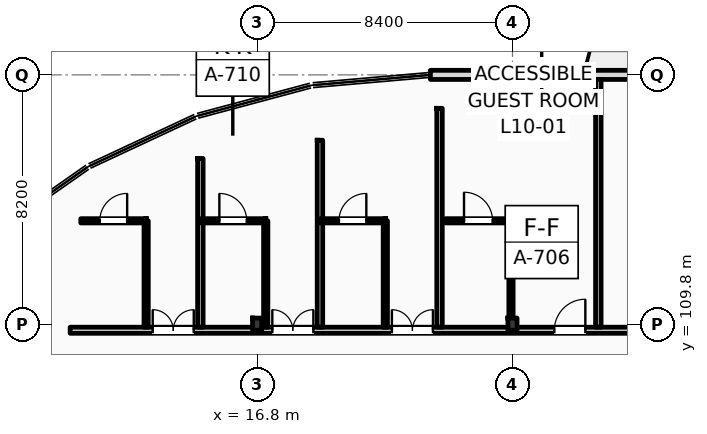
"""IFC4 building model, lengths in metres.
Left out: names, types, materials, properties, quantities, classifications, styles, units other than length and angle.
Written with IfcOpenShell. Run it as: python <this file> out.ifc"""

import sys

from ifc_helpers import new_model, si_unit, direction, frame, frame_2d, origin, origin_2d, place, context, subcontext, project, spatial, rectangle, i_section, extrude, element, fill, save


model = new_model("IFC4")
c1 = context("Model", 3, precision=1e-05, world=origin(), true_north=direction((0.0, 1.0)))
c2 = subcontext(c1, "Body", "Model", "MODEL_VIEW")
j1 = project(units=[si_unit("LENGTHUNIT", "METRE"), si_unit("PLANEANGLEUNIT", "RADIAN")], contexts=[c1])
p1 = place(None, origin())
s1 = spatial("IfcSite", under=j1, at=p1, CompositionType="ELEMENT")
p2 = place(p1, origin())
s2 = spatial("IfcBuilding", under=s1, at=p2, CompositionType="ELEMENT")
p3 = place(p2, frame((0.0, 0.0, 42.6)))
s3 = spatial("IfcBuildingStorey", under=s2, at=p3, CompositionType="ELEMENT", Elevation=42.6)
for number, where, z_axis, x_axis in (
    (1, (16.8, 109.8, 0.0), (0.0, 0.0, 1.0), (1.0, 0.0, 0.0)),
    (2, (25.2, 109.8, 0.0), (0.0, 0.0, 1.0), (1.0, 0.0, 0.0)),
):
    element("IfcColumn", number, at=place(p3, frame(where, z_axis=z_axis, x_axis=x_axis)), inside=s3, PredefinedType="COLUMN", context=c2, shape_type="SweptSolid", body=[
        extrude(i_section(OverallWidth=0.3, OverallDepth=0.4, WebThickness=0.013, FlangeThickness=0.024, FilletRadius=0.027, at=origin_2d()), origin(), (0.0, 0.0, 1.0), 4.2),
    ])
p4 = place(p3, frame((25.2, 118.0, 0.0), z_axis=(0.0, 0.0, 1.0), x_axis=(1.0, 0.0, 0.0)))
e3 = element("IfcColumn", 3, at=p4, inside=s3, PredefinedType="COLUMN", context=c2, shape_type="SweptSolid", body=[
    extrude(i_section(OverallWidth=0.3, OverallDepth=0.34, WebThickness=0.012, FlangeThickness=0.021, FilletRadius=0.027, at=origin_2d()), origin(), (0.0, 0.0, 1.0), 4.2),
])
p5 = place(p3, frame((22.5, 118.0, 0.0), z_axis=(0.0, 0.0, 1.0), x_axis=(1.0, 0.0, 0.0)))
e4 = element("IfcWall", 4, at=p5, inside=s3, PredefinedType="STANDARD", context=c2, shape_type="SweptSolid", body=[
    extrude(rectangle(XDim=72.9, YDim=0.3, at=frame_2d((36.45, 0.0))), origin(), (0.0, 0.0, 1.0), 3.42),
])
p6 = place(p5, frame((3.611, 0.0, 0.9)))
e5 = element("IfcOpeningElement", 5, at=p6, cuts=e4, PredefinedType="OPENING", context=c2, shape_type="SweptSolid", body=[
    extrude(rectangle(XDim=1.35, YDim=1.75, at=frame_2d((0.675, 0.875))), frame((0.0, 0.16, 0.0), z_axis=(0.0, -1.0, 0.0), x_axis=(1.0, 0.0, 0.0)), (0.0, 0.0, 1.0), 0.32),
])
p7 = place(p5, frame((7.091, 0.0, 0.0)))
e6 = element("IfcOpeningElement", 6, at=p7, cuts=e4, PredefinedType="OPENING", context=c2, shape_type="SweptSolid", body=[
    extrude(rectangle(XDim=1.2, YDim=2.25, at=frame_2d((0.6, 1.125))), frame((0.0, 0.16, 0.0), z_axis=(0.0, -1.0, 0.0), x_axis=(1.0, 0.0, 0.0)), (0.0, 0.0, 1.0), 0.32),
])
p8 = place(p5, frame((12.328, 0.0, 0.9)))
e7 = element("IfcOpeningElement", 7, at=p8, cuts=e4, PredefinedType="OPENING", context=c2, shape_type="SweptSolid", body=[
    extrude(rectangle(XDim=2.0, YDim=2.34, at=frame_2d((1.0, 1.17))), frame((0.0, 0.16, 0.0), z_axis=(0.0, -1.0, 0.0), x_axis=(1.0, 0.0, 0.0)), (0.0, 0.0, 1.0), 0.32),
])
p9 = place(p5, frame((19.12, 0.0, 0.9)))
e8 = element("IfcOpeningElement", 8, at=p9, cuts=e4, PredefinedType="OPENING", context=c2, shape_type="SweptSolid", body=[
    extrude(rectangle(XDim=1.35, YDim=2.34, at=frame_2d((0.675, 1.17))), frame((0.0, 0.16, 0.0), z_axis=(0.0, -1.0, 0.0), x_axis=(1.0, 0.0, 0.0)), (0.0, 0.0, 1.0), 0.32),
])
p10 = place(p5, frame((22.696, 0.0, 0.0)))
e9 = element("IfcOpeningElement", 9, at=p10, cuts=e4, PredefinedType="OPENING", context=c2, shape_type="SweptSolid", body=[
    extrude(rectangle(XDim=1.2, YDim=2.25, at=frame_2d((0.6, 1.125))), frame((0.0, 0.16, 0.0), z_axis=(0.0, -1.0, 0.0), x_axis=(1.0, 0.0, 0.0)), (0.0, 0.0, 1.0), 0.32),
])
p11 = place(p5, frame((27.205, 0.0, 0.9)))
e10 = element("IfcOpeningElement", 10, at=p11, cuts=e4, PredefinedType="OPENING", context=c2, shape_type="SweptSolid", body=[
    extrude(rectangle(XDim=3.1, YDim=2.34, at=frame_2d((1.55, 1.17))), frame((0.0, 0.16, 0.0), z_axis=(0.0, -1.0, 0.0), x_axis=(1.0, 0.0, 0.0)), (0.0, 0.0, 1.0), 0.32),
])
p12 = place(p5, frame((31.948, 0.0, 0.9)))
e11 = element("IfcOpeningElement", 11, at=p12, cuts=e4, PredefinedType="OPENING", context=c2, shape_type="SweptSolid", body=[
    extrude(rectangle(XDim=1.1, YDim=2.34, at=frame_2d((0.55, 1.17))), frame((0.0, 0.16, 0.0), z_axis=(0.0, -1.0, 0.0), x_axis=(1.0, 0.0, 0.0)), (0.0, 0.0, 1.0), 0.32),
])
p13 = place(p5, frame((38.12, 0.0, 0.0)))
e12 = element("IfcOpeningElement", 12, at=p13, cuts=e4, PredefinedType="OPENING", context=c2, shape_type="SweptSolid", body=[
    extrude(rectangle(XDim=1.2, YDim=2.25, at=frame_2d((0.6, 1.125))), frame((0.0, 0.16, 0.0), z_axis=(0.0, -1.0, 0.0), x_axis=(1.0, 0.0, 0.0)), (0.0, 0.0, 1.0), 0.32),
])
p14 = place(p5, frame((43.51, 0.0, 0.9)))
e13 = element("IfcOpeningElement", 13, at=p14, cuts=e4, PredefinedType="OPENING", context=c2, shape_type="SweptSolid", body=[
    extrude(rectangle(XDim=1.35, YDim=1.85, at=frame_2d((0.675, 0.925))), frame((0.0, 0.16, 0.0), z_axis=(0.0, -1.0, 0.0), x_axis=(1.0, 0.0, 0.0)), (0.0, 0.0, 1.0), 0.32),
])
p15 = place(p5, frame((47.178, 0.0, 0.9)))
e14 = element("IfcOpeningElement", 14, at=p15, cuts=e4, PredefinedType="OPENING", context=c2, shape_type="SweptSolid", body=[
    extrude(rectangle(XDim=1.5, YDim=1.9, at=frame_2d((0.75, 0.95))), frame((0.0, 0.16, 0.0), z_axis=(0.0, -1.0, 0.0), x_axis=(1.0, 0.0, 0.0)), (0.0, 0.0, 1.0), 0.32),
])
p16 = place(p5, frame((53.724, 0.0, 0.0)))
e15 = element("IfcOpeningElement", 15, at=p16, cuts=e4, PredefinedType="OPENING", context=c2, shape_type="SweptSolid", body=[
    extrude(rectangle(XDim=1.2, YDim=2.25, at=frame_2d((0.6, 1.125))), frame((0.0, 0.16, 0.0), z_axis=(0.0, -1.0, 0.0), x_axis=(1.0, 0.0, 0.0)), (0.0, 0.0, 1.0), 0.32),
])
p17 = place(p5, frame((58.712, 0.0, 0.9)))
e16 = element("IfcOpeningElement", 16, at=p17, cuts=e4, PredefinedType="OPENING", context=c2, shape_type="SweptSolid", body=[
    extrude(rectangle(XDim=1.8, YDim=2.0, at=frame_2d((0.9, 1.0))), frame((0.0, 0.16, 0.0), z_axis=(0.0, -1.0, 0.0), x_axis=(1.0, 0.0, 0.0)), (0.0, 0.0, 1.0), 0.32),
])
p18 = place(p5, frame((62.781, 0.0, 0.9)))
e17 = element("IfcOpeningElement", 17, at=p18, cuts=e4, PredefinedType="OPENING", context=c2, shape_type="SweptSolid", body=[
    extrude(rectangle(XDim=1.35, YDim=2.05, at=frame_2d((0.675, 1.025))), frame((0.0, 0.16, 0.0), z_axis=(0.0, -1.0, 0.0), x_axis=(1.0, 0.0, 0.0)), (0.0, 0.0, 1.0), 0.32),
])
p19 = place(p5, frame((68.819, 0.0, 0.9)))
e18 = element("IfcOpeningElement", 18, at=p19, cuts=e4, PredefinedType="OPENING", context=c2, shape_type="SweptSolid", body=[
    extrude(rectangle(XDim=2.1, YDim=2.1, at=frame_2d((1.05, 1.05))), frame((0.0, 0.16, 0.0), z_axis=(0.0, -1.0, 0.0), x_axis=(1.0, 0.0, 0.0)), (0.0, 0.0, 1.0), 0.32),
])
p20 = place(p3, frame((10.65, 109.6, 0.0), z_axis=(0.0, 0.0, 1.0), x_axis=(1.0, 0.0, 0.0)))
e19 = element("IfcWall", 19, at=p20, inside=s3, PredefinedType="PARTITIONING", context=c2, shape_type="SweptSolid", body=[
    extrude(rectangle(XDim=84.61, YDim=0.2, at=frame_2d((42.305, 0.0))), origin(), (0.0, 0.0, 1.0), 3.38),
])
p21 = place(p20, frame((15.926, 0.0, 0.0)))
e20 = element("IfcOpeningElement", 20, at=p21, cuts=e19, PredefinedType="OPENING", context=c2, shape_type="SweptSolid", body=[
    extrude(rectangle(XDim=1.02, YDim=2.2, at=frame_2d((0.51, 1.1))), frame((0.0, 0.11, 0.0), z_axis=(0.0, -1.0, 0.0), x_axis=(1.0, 0.0, 0.0)), (0.0, 0.0, 1.0), 0.22),
])
p22 = place(p20, frame((18.45, 0.0, 0.0)))
e21 = element("IfcOpeningElement", 21, at=p22, cuts=e19, PredefinedType="OPENING", context=c2, shape_type="SweptSolid", body=[
    extrude(rectangle(XDim=1.02, YDim=2.2, at=frame_2d((0.51, 1.1))), frame((0.0, 0.11, 0.0), z_axis=(0.0, -1.0, 0.0), x_axis=(1.0, 0.0, 0.0)), (0.0, 0.0, 1.0), 0.22),
])
p23 = place(p20, frame((25.742, 0.0, 0.0)))
e22 = element("IfcOpeningElement", 22, at=p23, cuts=e19, PredefinedType="OPENING", context=c2, shape_type="SweptSolid", body=[
    extrude(rectangle(XDim=1.02, YDim=2.2, at=frame_2d((0.51, 1.1))), frame((0.0, 0.11, 0.0), z_axis=(0.0, -1.0, 0.0), x_axis=(1.0, 0.0, 0.0)), (0.0, 0.0, 1.0), 0.22),
])
p24 = place(p20, frame((31.385, 0.0, 0.0)))
e23 = element("IfcOpeningElement", 23, at=p24, cuts=e19, PredefinedType="OPENING", context=c2, shape_type="SweptSolid", body=[
    extrude(rectangle(XDim=1.02, YDim=2.2, at=frame_2d((0.51, 1.1))), frame((0.0, 0.11, 0.0), z_axis=(0.0, -1.0, 0.0), x_axis=(1.0, 0.0, 0.0)), (0.0, 0.0, 1.0), 0.22),
])
p25 = place(p20, frame((33.908, 0.0, 0.0)))
e24 = element("IfcOpeningElement", 24, at=p25, cuts=e19, PredefinedType="OPENING", context=c2, shape_type="SweptSolid", body=[
    extrude(rectangle(XDim=0.96, YDim=2.2, at=frame_2d((0.48, 1.1))), frame((0.0, 0.11, 0.0), z_axis=(0.0, -1.0, 0.0), x_axis=(1.0, 0.0, 0.0)), (0.0, 0.0, 1.0), 0.22),
])
p26 = place(p20, frame((41.201, 0.0, 0.0)))
e25 = element("IfcOpeningElement", 25, at=p26, cuts=e19, PredefinedType="OPENING", context=c2, shape_type="SweptSolid", body=[
    extrude(rectangle(XDim=0.96, YDim=2.2, at=frame_2d((0.48, 1.1))), frame((0.0, 0.11, 0.0), z_axis=(0.0, -1.0, 0.0), x_axis=(1.0, 0.0, 0.0)), (0.0, 0.0, 1.0), 0.22),
])
p27 = place(p20, frame((46.844, 0.0, 0.0)))
e26 = element("IfcOpeningElement", 26, at=p27, cuts=e19, PredefinedType="OPENING", context=c2, shape_type="SweptSolid", body=[
    extrude(rectangle(XDim=0.96, YDim=2.2, at=frame_2d((0.48, 1.1))), frame((0.0, 0.11, 0.0), z_axis=(0.0, -1.0, 0.0), x_axis=(1.0, 0.0, 0.0)), (0.0, 0.0, 1.0), 0.22),
])
p28 = place(p20, frame((49.337, 0.0, 0.0)))
e27 = element("IfcOpeningElement", 27, at=p28, cuts=e19, PredefinedType="OPENING", context=c2, shape_type="SweptSolid", body=[
    extrude(rectangle(XDim=0.96, YDim=2.2, at=frame_2d((0.48, 1.1))), frame((0.0, 0.11, 0.0), z_axis=(0.0, -1.0, 0.0), x_axis=(1.0, 0.0, 0.0)), (0.0, 0.0, 1.0), 0.22),
])
p29 = place(p20, frame((56.63, 0.0, 0.0)))
e28 = element("IfcOpeningElement", 28, at=p29, cuts=e19, PredefinedType="OPENING", context=c2, shape_type="SweptSolid", body=[
    extrude(rectangle(XDim=0.96, YDim=2.2, at=frame_2d((0.48, 1.1))), frame((0.0, 0.11, 0.0), z_axis=(0.0, -1.0, 0.0), x_axis=(1.0, 0.0, 0.0)), (0.0, 0.0, 1.0), 0.22),
])
p30 = place(p20, frame((62.523, 0.0, 0.0)))
e29 = element("IfcOpeningElement", 29, at=p30, cuts=e19, PredefinedType="OPENING", context=c2, shape_type="SweptSolid", body=[
    extrude(rectangle(XDim=0.96, YDim=2.2, at=frame_2d((0.48, 1.1))), frame((0.0, 0.11, 0.0), z_axis=(0.0, -1.0, 0.0), x_axis=(1.0, 0.0, 0.0)), (0.0, 0.0, 1.0), 0.22),
])
p31 = place(p20, frame((64.765, 0.0, 0.0)))
e30 = element("IfcOpeningElement", 30, at=p31, cuts=e19, PredefinedType="OPENING", context=c2, shape_type="SweptSolid", body=[
    extrude(rectangle(XDim=0.96, YDim=2.2, at=frame_2d((0.48, 1.1))), frame((0.0, 0.11, 0.0), z_axis=(0.0, -1.0, 0.0), x_axis=(1.0, 0.0, 0.0)), (0.0, 0.0, 1.0), 0.22),
])
p32 = place(p20, frame((72.057, 0.0, 0.0)))
e31 = element("IfcOpeningElement", 31, at=p32, cuts=e19, PredefinedType="OPENING", context=c2, shape_type="SweptSolid", body=[
    extrude(rectangle(XDim=0.96, YDim=2.2, at=frame_2d((0.48, 1.1))), frame((0.0, 0.11, 0.0), z_axis=(0.0, -1.0, 0.0), x_axis=(1.0, 0.0, 0.0)), (0.0, 0.0, 1.0), 0.22),
])
p33 = place(p20, frame((74.55, 0.0, 0.0)))
e32 = element("IfcOpeningElement", 32, at=p33, cuts=e19, PredefinedType="OPENING", context=c2, shape_type="SweptSolid", body=[
    extrude(rectangle(XDim=0.96, YDim=2.2, at=frame_2d((0.48, 1.1))), frame((0.0, 0.11, 0.0), z_axis=(0.0, -1.0, 0.0), x_axis=(1.0, 0.0, 0.0)), (0.0, 0.0, 1.0), 0.22),
])
p34 = place(p20, frame((80.163, 0.0, 0.0)))
e33 = element("IfcOpeningElement", 33, at=p34, cuts=e19, PredefinedType="OPENING", context=c2, shape_type="SweptSolid", body=[
    extrude(rectangle(XDim=0.96, YDim=2.2, at=frame_2d((0.48, 1.1))), frame((0.0, 0.11, 0.0), z_axis=(0.0, -1.0, 0.0), x_axis=(1.0, 0.0, 0.0)), (0.0, 0.0, 1.0), 0.22),
])
p35 = place(p20, frame((2.716, 0.0, 0.0)))
e34 = element("IfcOpeningElement", 34, at=p35, cuts=e19, PredefinedType="OPENING", context=c2, shape_type="SweptSolid", body=[
    extrude(rectangle(XDim=1.35, YDim=2.25, at=frame_2d((0.675, 1.125))), frame((0.0, 0.11, 0.0), z_axis=(0.0, -1.0, 0.0), x_axis=(1.0, 0.0, 0.0)), (0.0, 0.0, 1.0), 0.22),
])
p36 = place(p20, frame((6.65, 0.0, 0.0)))
e35 = element("IfcOpeningElement", 35, at=p36, cuts=e19, PredefinedType="OPENING", context=c2, shape_type="SweptSolid", body=[
    extrude(rectangle(XDim=1.35, YDim=2.25, at=frame_2d((0.675, 1.125))), frame((0.0, 0.11, 0.0), z_axis=(0.0, -1.0, 0.0), x_axis=(1.0, 0.0, 0.0)), (0.0, 0.0, 1.0), 0.22),
])
p37 = place(p20, frame((10.583, 0.0, 0.0)))
e36 = element("IfcOpeningElement", 36, at=p37, cuts=e19, PredefinedType="OPENING", context=c2, shape_type="SweptSolid", body=[
    extrude(rectangle(XDim=1.35, YDim=2.25, at=frame_2d((0.675, 1.125))), frame((0.0, 0.11, 0.0), z_axis=(0.0, -1.0, 0.0), x_axis=(1.0, 0.0, 0.0)), (0.0, 0.0, 1.0), 0.22),
])
p38 = place(p3, frame((28.023, 109.7, 0.0), z_axis=(0.0, 0.0, 1.0), x_axis=(0.0, 1.0, 0.0)))
e37 = element("IfcWall", 37, at=p38, inside=s3, PredefinedType="PARTITIONING", context=c2, shape_type="SweptSolid", body=[
    extrude(rectangle(XDim=8.15, YDim=0.18, at=frame_2d((4.075, 0.0))), origin(), (0.0, 0.0, 1.0), 3.63),
])
p39 = place(p3, frame((25.15, 109.7, 0.0), z_axis=(0.0, 0.0, 1.0), x_axis=(0.0, 1.0, 0.0)))
e38 = element("IfcWall", 38, at=p39, inside=s3, PredefinedType="PARTITIONING", context=c2, shape_type="SweptSolid", body=[
    extrude(rectangle(XDim=3.5, YDim=0.14, at=frame_2d((1.75, 0.0))), origin(), (0.0, 0.0, 1.0), 3.57),
])
p40 = place(p3, frame((23.0, 113.2, 0.0), z_axis=(0.0, 0.0, 1.0), x_axis=(1.0, 0.0, 0.0)))
e39 = element("IfcWall", 39, at=p40, inside=s3, PredefinedType="PARTITIONING", context=c2, shape_type="SweptSolid", body=[
    extrude(rectangle(XDim=2.15, YDim=0.14, at=frame_2d((1.075, 0.0))), origin(), (0.0, 0.0, 1.0), 3.94),
])
p41 = place(p40, frame((0.605, 0.0, 0.0)))
e40 = element("IfcOpeningElement", 40, at=p41, cuts=e39, PredefinedType="OPENING", context=c2, shape_type="SweptSolid", body=[
    extrude(rectangle(XDim=0.94, YDim=2.15, at=frame_2d((0.47, 1.075))), frame((0.0, 0.08, 0.0), z_axis=(0.0, -1.0, 0.0), x_axis=(1.0, 0.0, 0.0)), (0.0, 0.0, 1.0), 0.16),
])
p42 = place(p3, frame((14.933, 109.7, 0.0), z_axis=(0.0, 0.0, 1.0), x_axis=(0.0, 1.0, 0.0)))
e41 = element("IfcWall", 41, at=p42, inside=s3, PredefinedType="PARTITIONING", context=c2, shape_type="SweptSolid", body=[
    extrude(rectangle(XDim=5.55, YDim=0.18, at=frame_2d((2.775, 0.0))), origin(), (0.0, 0.0, 1.0), 3.94),
])
p43 = place(p3, frame((13.15, 109.7, 0.0), z_axis=(0.0, 0.0, 1.0), x_axis=(0.0, 1.0, 0.0)))
e42 = element("IfcWall", 42, at=p43, inside=s3, PredefinedType="PARTITIONING", context=c2, shape_type="SweptSolid", body=[
    extrude(rectangle(XDim=3.5, YDim=0.14, at=frame_2d((1.75, 0.0))), origin(), (0.0, 0.0, 1.0), 3.94),
])
p44 = place(p3, frame((11.0, 113.2, 0.0), z_axis=(0.0, 0.0, 1.0), x_axis=(1.0, 0.0, 0.0)))
e43 = element("IfcWall", 43, at=p44, inside=s3, PredefinedType="PARTITIONING", context=c2, shape_type="SweptSolid", body=[
    extrude(rectangle(XDim=2.15, YDim=0.14, at=frame_2d((1.075, 0.0))), origin(), (0.0, 0.0, 1.0), 3.94),
])
p45 = place(p44, frame((0.625, 0.0, 0.0)))
e44 = element("IfcOpeningElement", 44, at=p45, cuts=e43, PredefinedType="OPENING", context=c2, shape_type="SweptSolid", body=[
    extrude(rectangle(XDim=0.9, YDim=2.1, at=frame_2d((0.45, 1.05))), frame((0.0, 0.08, 0.0), z_axis=(0.0, -1.0, 0.0), x_axis=(1.0, 0.0, 0.0)), (0.0, 0.0, 1.0), 0.16),
])
p46 = place(p3, frame((18.867, 109.7, 0.0), z_axis=(0.0, 0.0, 1.0), x_axis=(0.0, 1.0, 0.0)))
e45 = element("IfcWall", 45, at=p46, inside=s3, PredefinedType="PARTITIONING", context=c2, shape_type="SweptSolid", body=[
    extrude(rectangle(XDim=6.15, YDim=0.18, at=frame_2d((3.075, 0.0))), origin(), (0.0, 0.0, 1.0), 3.94),
])
p47 = place(p3, frame((17.083, 109.7, 0.0), z_axis=(0.0, 0.0, 1.0), x_axis=(0.0, 1.0, 0.0)))
e46 = element("IfcWall", 46, at=p47, inside=s3, PredefinedType="PARTITIONING", context=c2, shape_type="SweptSolid", body=[
    extrude(rectangle(XDim=3.5, YDim=0.14, at=frame_2d((1.75, 0.0))), origin(), (0.0, 0.0, 1.0), 3.94),
])
p48 = place(p3, frame((14.933, 113.2, 0.0), z_axis=(0.0, 0.0, 1.0), x_axis=(1.0, 0.0, 0.0)))
e47 = element("IfcWall", 47, at=p48, inside=s3, PredefinedType="PARTITIONING", context=c2, shape_type="SweptSolid", body=[
    extrude(rectangle(XDim=2.15, YDim=0.14, at=frame_2d((1.075, 0.0))), origin(), (0.0, 0.0, 1.0), 3.94),
])
p49 = place(p48, frame((0.625, 0.0, 0.0)))
e48 = element("IfcOpeningElement", 48, at=p49, cuts=e47, PredefinedType="OPENING", context=c2, shape_type="SweptSolid", body=[
    extrude(rectangle(XDim=0.9, YDim=2.1, at=frame_2d((0.45, 1.05))), frame((0.0, 0.08, 0.0), z_axis=(0.0, -1.0, 0.0), x_axis=(1.0, 0.0, 0.0)), (0.0, 0.0, 1.0), 0.16),
])
p50 = place(p3, frame((22.8, 109.7, 0.0), z_axis=(0.0, 0.0, 1.0), x_axis=(0.0, 1.0, 0.0)))
e49 = element("IfcWall", 49, at=p50, inside=s3, PredefinedType="PARTITIONING", context=c2, shape_type="SweptSolid", body=[
    extrude(rectangle(XDim=7.2, YDim=0.18, at=frame_2d((3.6, 0.0))), origin(), (0.0, 0.0, 1.0), 3.94),
])
p51 = place(p3, frame((21.017, 109.7, 0.0), z_axis=(0.0, 0.0, 1.0), x_axis=(0.0, 1.0, 0.0)))
e50 = element("IfcWall", 50, at=p51, inside=s3, PredefinedType="PARTITIONING", context=c2, shape_type="SweptSolid", body=[
    extrude(rectangle(XDim=3.5, YDim=0.14, at=frame_2d((1.75, 0.0))), origin(), (0.0, 0.0, 1.0), 3.94),
])
p52 = place(p3, frame((18.867, 113.2, 0.0), z_axis=(0.0, 0.0, 1.0), x_axis=(1.0, 0.0, 0.0)))
e51 = element("IfcWall", 51, at=p52, inside=s3, PredefinedType="PARTITIONING", context=c2, shape_type="SweptSolid", body=[
    extrude(rectangle(XDim=2.15, YDim=0.14, at=frame_2d((1.075, 0.0))), origin(), (0.0, 0.0, 1.0), 3.94),
])
p53 = place(p52, frame((0.625, 0.0, 0.0)))
e52 = element("IfcOpeningElement", 52, at=p53, cuts=e51, PredefinedType="OPENING", context=c2, shape_type="SweptSolid", body=[
    extrude(rectangle(XDim=0.9, YDim=2.1, at=frame_2d((0.45, 1.05))), frame((0.0, 0.08, 0.0), z_axis=(0.0, -1.0, 0.0), x_axis=(1.0, 0.0, 0.0)), (0.0, 0.0, 1.0), 0.16),
])
p54 = place(p6, origin())
e53 = element("IfcWindow", 53, at=p54, inside=s3, PartitioningType="DOUBLE_PANEL_VERTICAL", PredefinedType="WINDOW", context=c2, shape_type="SweptSolid", body=[
    extrude(rectangle(XDim=1.35, YDim=1.75, at=frame_2d((0.675, 0.875))), frame((0.0, 0.03, 0.0), z_axis=(0.0, -1.0, 0.0), x_axis=(1.0, 0.0, 0.0)), (0.0, 0.0, 1.0), 0.06),
])
fill(e5, e53)
p55 = place(p21, origin())
e54 = element("IfcDoor", 54, at=p55, inside=s3, OperationType="SINGLE_SWING_RIGHT", PredefinedType="DOOR", context=c2, shape_type="SweptSolid", body=[
    extrude(rectangle(XDim=1.02, YDim=2.2, at=frame_2d((0.51, 1.1))), frame((0.0, 0.025, 0.0), z_axis=(0.0, -1.0, 0.0), x_axis=(1.0, 0.0, 0.0)), (0.0, 0.0, 1.0), 0.05),
])
fill(e20, e54)
p56 = place(p41, origin())
e55 = element("IfcDoor", 55, at=p56, inside=s3, OperationType="SINGLE_SWING_LEFT", PredefinedType="DOOR", context=c2, shape_type="SweptSolid", body=[
    extrude(rectangle(XDim=0.94, YDim=2.15, at=frame_2d((0.47, 1.075))), frame((0.0, 0.025, 0.0), z_axis=(0.0, -1.0, 0.0), x_axis=(1.0, 0.0, 0.0)), (0.0, 0.0, 1.0), 0.05),
])
fill(e40, e55)
p57 = place(p35, origin())
e56 = element("IfcDoor", 56, at=p57, inside=s3, OperationType="DOUBLE_SWING_LEFT", PredefinedType="DOOR", context=c2, shape_type="SweptSolid", body=[
    extrude(rectangle(XDim=1.35, YDim=2.25, at=frame_2d((0.675, 1.125))), frame((0.0, 0.025, 0.0), z_axis=(0.0, -1.0, 0.0), x_axis=(1.0, 0.0, 0.0)), (0.0, 0.0, 1.0), 0.05),
])
fill(e34, e56)
p58 = place(p45, origin())
e57 = element("IfcDoor", 57, at=p58, inside=s3, OperationType="SINGLE_SWING_RIGHT", PredefinedType="DOOR", context=c2, shape_type="SweptSolid", body=[
    extrude(rectangle(XDim=0.9, YDim=2.1, at=frame_2d((0.45, 1.05))), frame((0.0, 0.025, 0.0), z_axis=(0.0, -1.0, 0.0), x_axis=(1.0, 0.0, 0.0)), (0.0, 0.0, 1.0), 0.05),
])
fill(e44, e57)
p59 = place(p36, origin())
e58 = element("IfcDoor", 58, at=p59, inside=s3, OperationType="DOUBLE_SWING_LEFT", PredefinedType="DOOR", context=c2, shape_type="SweptSolid", body=[
    extrude(rectangle(XDim=1.35, YDim=2.25, at=frame_2d((0.675, 1.125))), frame((0.0, 0.025, 0.0), z_axis=(0.0, -1.0, 0.0), x_axis=(1.0, 0.0, 0.0)), (0.0, 0.0, 1.0), 0.05),
])
fill(e35, e58)
p60 = place(p49, origin())
e59 = element("IfcDoor", 59, at=p60, inside=s3, OperationType="SINGLE_SWING_LEFT", PredefinedType="DOOR", context=c2, shape_type="SweptSolid", body=[
    extrude(rectangle(XDim=0.9, YDim=2.1, at=frame_2d((0.45, 1.05))), frame((0.0, 0.025, 0.0), z_axis=(0.0, -1.0, 0.0), x_axis=(1.0, 0.0, 0.0)), (0.0, 0.0, 1.0), 0.05),
])
fill(e48, e59)
p61 = place(p37, origin())
e60 = element("IfcDoor", 60, at=p61, inside=s3, OperationType="DOUBLE_SWING_LEFT", PredefinedType="DOOR", context=c2, shape_type="SweptSolid", body=[
    extrude(rectangle(XDim=1.35, YDim=2.25, at=frame_2d((0.675, 1.125))), frame((0.0, 0.025, 0.0), z_axis=(0.0, -1.0, 0.0), x_axis=(1.0, 0.0, 0.0)), (0.0, 0.0, 1.0), 0.05),
])
fill(e36, e60)
p62 = place(p53, origin())
e61 = element("IfcDoor", 61, at=p62, inside=s3, OperationType="SINGLE_SWING_RIGHT", PredefinedType="DOOR", context=c2, shape_type="SweptSolid", body=[
    extrude(rectangle(XDim=0.9, YDim=2.1, at=frame_2d((0.45, 1.05))), frame((0.0, 0.025, 0.0), z_axis=(0.0, -1.0, 0.0), x_axis=(1.0, 0.0, 0.0)), (0.0, 0.0, 1.0), 0.05),
])
fill(e52, e61)
save(model, sys.argv[1])
